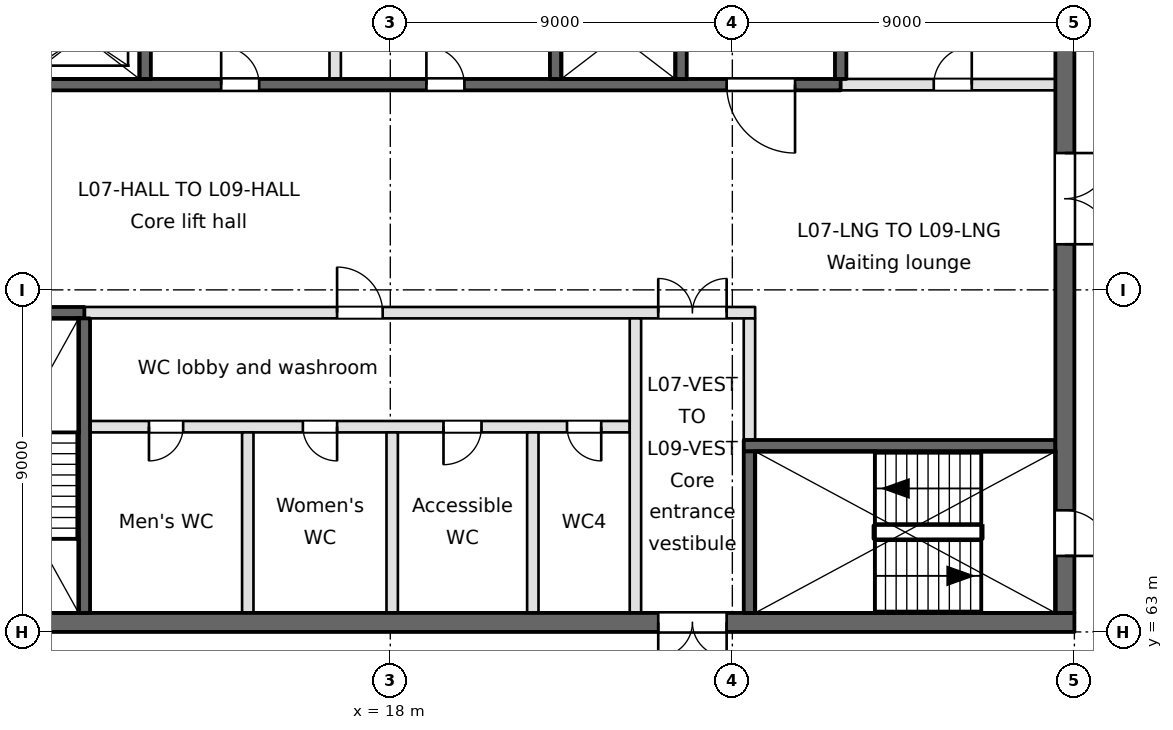
"""IFC4 building model, lengths in metres.
Left out: names, types, materials, properties, quantities, classifications, styles, units other than length and angle.
Written with IfcOpenShell. Run it as: python <this file> out.ifc"""

import sys

from ifc_helpers import new_model, si_unit, direction, frame, frame_2d, origin, place, context, subcontext, project, spatial, rectangle, extrude, element, fill, save


model = new_model("IFC4")
c1 = context("Model", 3, precision=1e-05, world=origin(), true_north=direction((0.0, 1.0)))
c2 = subcontext(c1, "Body", "Model", "MODEL_VIEW")
j1 = project(units=[si_unit("LENGTHUNIT", "METRE"), si_unit("PLANEANGLEUNIT", "RADIAN")], contexts=[c1])
p1 = place(None, origin())
s1 = spatial("IfcSite", under=j1, at=p1, CompositionType="ELEMENT")
p2 = place(p1, origin())
s2 = spatial("IfcBuilding", under=s1, at=p2, CompositionType="ELEMENT")
p3 = place(p2, frame((0.0, 0.0, 35.8)))
s3 = spatial("IfcBuildingStorey", under=s2, at=p3, CompositionType="ELEMENT", Elevation=35.8)
p4 = place(p3, frame((0.9, 63.25, -0.4), z_axis=(0.0, 0.0, 1.0), x_axis=(1.0, 0.0, 0.0)))
e1 = element("IfcWall", 1, at=p4, inside=s3, PredefinedType="SOLIDWALL", context=c2, shape_type="SweptSolid", body=[
    extrude(rectangle(XDim=35.1, YDim=0.5, at=frame_2d((17.55, 0.0))), origin(), (0.0, 0.0, 1.0), 3.7),
])
p5 = place(p4, frame((24.15, 0.0, 0.4)))
e2 = element("IfcOpeningElement", 2, at=p5, cuts=e1, PredefinedType="OPENING", context=c2, shape_type="SweptSolid", body=[
    extrude(rectangle(XDim=1.8, YDim=2.1, at=frame_2d((0.9, 1.05))), frame((0.0, 0.25, 0.0), z_axis=(0.0, -1.0, 0.0), x_axis=(1.0, 0.0, 0.0)), (0.0, 0.0, 1.0), 0.5),
])
p6 = place(p4, frame((1.55, 0.0, 0.4)))
e3 = element("IfcOpeningElement", 3, at=p6, cuts=e1, PredefinedType="OPENING", context=c2, shape_type="SweptSolid", body=[
    extrude(rectangle(XDim=1.2, YDim=2.1, at=frame_2d((0.6, 1.05))), frame((0.0, 0.25, 0.0), z_axis=(0.0, -1.0, 0.0), x_axis=(1.0, 0.0, 0.0)), (0.0, 0.0, 1.0), 0.5),
])
p7 = place(p4, frame((6.15, 0.0, 0.4)))
e4 = element("IfcOpeningElement", 4, at=p7, cuts=e1, PredefinedType="OPENING", context=c2, shape_type="SweptSolid", body=[
    extrude(rectangle(XDim=1.2, YDim=2.1, at=frame_2d((0.6, 1.05))), frame((0.0, 0.25, 0.0), z_axis=(0.0, -1.0, 0.0), x_axis=(1.0, 0.0, 0.0)), (0.0, 0.0, 1.0), 0.5),
])
p8 = place(p3, frame((27.3, 67.9, -0.4), z_axis=(0.0, 0.0, 1.0), x_axis=(1.0, 0.0, 0.0)))
e5 = element("IfcWall", 5, at=p8, inside=s3, PredefinedType="SOLIDWALL", context=c2, shape_type="SweptSolid", body=[
    extrude(rectangle(XDim=8.2, YDim=0.3, at=frame_2d((4.1, 0.0))), origin(), (0.0, 0.0, 1.0), 3.7),
])
p9 = place(p3, frame((10.1, 68.4, 0.0), z_axis=(0.0, 0.0, 1.0), x_axis=(1.0, 0.0, 0.0)))
e6 = element("IfcWall", 6, at=p9, inside=s3, PredefinedType="PARTITIONING", context=c2, shape_type="SweptSolid", body=[
    extrude(rectangle(XDim=14.2, YDim=0.3, at=frame_2d((7.1, 0.0))), origin(), (0.0, 0.0, 1.0), 3.3),
])
p10 = place(p9, frame((1.55, 0.0, 0.0)))
e7 = element("IfcOpeningElement", 7, at=p10, cuts=e6, PredefinedType="OPENING", context=c2, shape_type="SweptSolid", body=[
    extrude(rectangle(XDim=0.9, YDim=2.1, at=frame_2d((0.45, 1.05))), frame((0.0, 0.15, 0.0), z_axis=(0.0, -1.0, 0.0), x_axis=(1.0, 0.0, 0.0)), (0.0, 0.0, 1.0), 0.3),
])
p11 = place(p9, frame((5.6, 0.0, 0.0)))
e8 = element("IfcOpeningElement", 8, at=p11, cuts=e6, PredefinedType="OPENING", context=c2, shape_type="SweptSolid", body=[
    extrude(rectangle(XDim=0.9, YDim=2.1, at=frame_2d((0.45, 1.05))), frame((0.0, 0.15, 0.0), z_axis=(0.0, -1.0, 0.0), x_axis=(1.0, 0.0, 0.0)), (0.0, 0.0, 1.0), 0.3),
])
p12 = place(p9, frame((9.3, 0.0, 0.0)))
e9 = element("IfcOpeningElement", 9, at=p12, cuts=e6, PredefinedType="OPENING", context=c2, shape_type="SweptSolid", body=[
    extrude(rectangle(XDim=1.0, YDim=2.1, at=frame_2d((0.5, 1.05))), frame((0.0, 0.15, 0.0), z_axis=(0.0, -1.0, 0.0), x_axis=(1.0, 0.0, 0.0)), (0.0, 0.0, 1.0), 0.3),
])
p13 = place(p9, frame((12.55, 0.0, 0.0)))
e10 = element("IfcOpeningElement", 10, at=p13, cuts=e6, PredefinedType="OPENING", context=c2, shape_type="SweptSolid", body=[
    extrude(rectangle(XDim=0.9, YDim=2.1, at=frame_2d((0.45, 1.05))), frame((0.0, 0.15, 0.0), z_axis=(0.0, -1.0, 0.0), x_axis=(1.0, 0.0, 0.0)), (0.0, 0.0, 1.0), 0.3),
])
p14 = place(p3, frame((0.9, 71.4, -0.4), z_axis=(0.0, 0.0, 1.0), x_axis=(1.0, 0.0, 0.0)))
e11 = element("IfcWall", 11, at=p14, inside=s3, PredefinedType="SOLIDWALL", context=c2, shape_type="SweptSolid", body=[
    extrude(rectangle(XDim=9.05, YDim=0.3, at=frame_2d((4.525, 0.0))), origin(), (0.0, 0.0, 1.0), 3.7),
])
p15 = place(p3, frame((9.95, 71.4, 0.0), z_axis=(0.0, 0.0, 1.0), x_axis=(1.0, 0.0, 0.0)))
e12 = element("IfcWall", 12, at=p15, inside=s3, PredefinedType="PARTITIONING", context=c2, shape_type="SweptSolid", body=[
    extrude(rectangle(XDim=17.65, YDim=0.3, at=frame_2d((8.825, 0.0))), origin(), (0.0, 0.0, 1.0), 3.3),
])
p16 = place(p15, frame((15.1, 0.0, 0.0)))
e13 = element("IfcOpeningElement", 13, at=p16, cuts=e12, PredefinedType="OPENING", context=c2, shape_type="SweptSolid", body=[
    extrude(rectangle(XDim=1.8, YDim=2.1, at=frame_2d((0.9, 1.05))), frame((0.0, 0.15, 0.0), z_axis=(0.0, -1.0, 0.0), x_axis=(1.0, 0.0, 0.0)), (0.0, 0.0, 1.0), 0.3),
])
p17 = place(p15, frame((6.65, 0.0, 0.0)))
e14 = element("IfcOpeningElement", 14, at=p17, cuts=e12, PredefinedType="OPENING", context=c2, shape_type="SweptSolid", body=[
    extrude(rectangle(XDim=1.2, YDim=2.1, at=frame_2d((0.6, 1.05))), frame((0.0, 0.15, 0.0), z_axis=(0.0, -1.0, 0.0), x_axis=(1.0, 0.0, 0.0)), (0.0, 0.0, 1.0), 0.3),
])
p18 = place(p3, frame((0.9, 77.4, -0.4), z_axis=(0.0, 0.0, 1.0), x_axis=(1.0, 0.0, 0.0)))
e15 = element("IfcWall", 15, at=p18, inside=s3, PredefinedType="SOLIDWALL", context=c2, shape_type="SweptSolid", body=[
    extrude(rectangle(XDim=28.95, YDim=0.3, at=frame_2d((14.475, 0.0))), origin(), (0.0, 0.0, 1.0), 3.7),
])
p19 = place(p18, frame((4.35, 0.0, 0.4)))
e16 = element("IfcOpeningElement", 16, at=p19, cuts=e15, PredefinedType="OPENING", context=c2, shape_type="SweptSolid", body=[
    extrude(rectangle(XDim=1.8, YDim=2.1, at=frame_2d((0.9, 1.05))), frame((0.0, 0.15, 0.0), z_axis=(0.0, -1.0, 0.0), x_axis=(1.0, 0.0, 0.0)), (0.0, 0.0, 1.0), 0.3),
])
p20 = place(p18, frame((25.95, 0.0, 0.4)))
e17 = element("IfcOpeningElement", 17, at=p20, cuts=e15, PredefinedType="OPENING", context=c2, shape_type="SweptSolid", body=[
    extrude(rectangle(XDim=1.8, YDim=2.1, at=frame_2d((0.9, 1.05))), frame((0.0, 0.15, 0.0), z_axis=(0.0, -1.0, 0.0), x_axis=(1.0, 0.0, 0.0)), (0.0, 0.0, 1.0), 0.3),
])
p21 = place(p18, frame((12.65, 0.0, 0.4)))
e18 = element("IfcOpeningElement", 18, at=p21, cuts=e15, PredefinedType="OPENING", context=c2, shape_type="SweptSolid", body=[
    extrude(rectangle(XDim=1.0, YDim=2.1, at=frame_2d((0.5, 1.05))), frame((0.0, 0.15, 0.0), z_axis=(0.0, -1.0, 0.0), x_axis=(1.0, 0.0, 0.0)), (0.0, 0.0, 1.0), 0.3),
])
p22 = place(p18, frame((18.05, 0.0, 0.4)))
e19 = element("IfcOpeningElement", 19, at=p22, cuts=e15, PredefinedType="OPENING", context=c2, shape_type="SweptSolid", body=[
    extrude(rectangle(XDim=1.0, YDim=2.1, at=frame_2d((0.5, 1.05))), frame((0.0, 0.15, 0.0), z_axis=(0.0, -1.0, 0.0), x_axis=(1.0, 0.0, 0.0)), (0.0, 0.0, 1.0), 0.3),
])
p23 = place(p3, frame((29.85, 77.4, 0.0), z_axis=(0.0, 0.0, 1.0), x_axis=(1.0, 0.0, 0.0)))
e20 = element("IfcWall", 20, at=p23, inside=s3, PredefinedType="PARTITIONING", context=c2, shape_type="SweptSolid", body=[
    extrude(rectangle(XDim=5.65, YDim=0.3, at=frame_2d((2.825, 0.0))), origin(), (0.0, 0.0, 1.0), 3.3),
])
p24 = place(p23, frame((2.45, 0.0, 0.0)))
e21 = element("IfcOpeningElement", 21, at=p24, cuts=e20, PredefinedType="OPENING", context=c2, shape_type="SweptSolid", body=[
    extrude(rectangle(XDim=1.0, YDim=2.1, at=frame_2d((0.5, 1.05))), frame((0.0, 0.15, 0.0), z_axis=(0.0, -1.0, 0.0), x_axis=(1.0, 0.0, 0.0)), (0.0, 0.0, 1.0), 0.3),
])
p25 = place(p3, frame((9.95, 63.5, -0.4), z_axis=(0.0, 0.0, 1.0), x_axis=(0.0, 1.0, 0.0)))
e22 = element("IfcWall", 22, at=p25, inside=s3, PredefinedType="SOLIDWALL", context=c2, shape_type="SweptSolid", body=[
    extrude(rectangle(XDim=7.75, YDim=0.3, at=frame_2d((3.875, 0.0))), origin(), (0.0, 0.0, 1.0), 3.7),
])
p26 = place(p3, frame((11.55, 77.55, -0.4), z_axis=(0.0, 0.0, 1.0), x_axis=(0.0, 1.0, 0.0)))
e23 = element("IfcWall", 23, at=p26, inside=s3, PredefinedType="SOLIDWALL", context=c2, shape_type="SweptSolid", body=[
    extrude(rectangle(XDim=10.1, YDim=0.3, at=frame_2d((5.05, 0.0))), origin(), (0.0, 0.0, 1.0), 3.7),
])
p27 = place(p3, frame((14.25, 63.5, 0.0), z_axis=(0.0, 0.0, 1.0), x_axis=(0.0, 1.0, 0.0)))
e24 = element("IfcWall", 24, at=p27, inside=s3, PredefinedType="PARTITIONING", context=c2, shape_type="SweptSolid", body=[
    extrude(rectangle(XDim=4.75, YDim=0.3, at=frame_2d((2.375, 0.0))), origin(), (0.0, 0.0, 1.0), 3.3),
])
p28 = place(p3, frame((16.55, 77.55, 0.0), z_axis=(0.0, 0.0, 1.0), x_axis=(0.0, 1.0, 0.0)))
e25 = element("IfcWall", 25, at=p28, inside=s3, PredefinedType="PARTITIONING", context=c2, shape_type="SweptSolid", body=[
    extrude(rectangle(XDim=12.95, YDim=0.3, at=frame_2d((6.475, 0.0))), origin(), (0.0, 0.0, 1.0), 3.3),
])
for number, where, z_axis, x_axis in (
    (26, (18.05, 63.5, 0.0), (0.0, 0.0, 1.0), (0.0, 1.0, 0.0)),
    (27, (21.75, 63.5, 0.0), (0.0, 0.0, 1.0), (0.0, 1.0, 0.0)),
):
    element("IfcWall", number, at=place(p3, frame(where, z_axis=z_axis, x_axis=x_axis)), inside=s3, PredefinedType="PARTITIONING", context=c2, shape_type="SweptSolid", body=[
        extrude(rectangle(XDim=4.75, YDim=0.3, at=frame_2d((2.375, 0.0))), origin(), (0.0, 0.0, 1.0), 3.3),
    ])
p29 = place(p3, frame((22.35, 77.55, -0.4), z_axis=(0.0, 0.0, 1.0), x_axis=(0.0, 1.0, 0.0)))
e28 = element("IfcWall", 28, at=p29, inside=s3, PredefinedType="SOLIDWALL", context=c2, shape_type="SweptSolid", body=[
    extrude(rectangle(XDim=10.1, YDim=0.3, at=frame_2d((5.05, 0.0))), origin(), (0.0, 0.0, 1.0), 3.7),
])
p30 = place(p3, frame((24.45, 63.5, 0.0), z_axis=(0.0, 0.0, 1.0), x_axis=(0.0, 1.0, 0.0)))
e29 = element("IfcWall", 29, at=p30, inside=s3, PredefinedType="PARTITIONING", context=c2, shape_type="SweptSolid", body=[
    extrude(rectangle(XDim=7.75, YDim=0.3, at=frame_2d((3.875, 0.0))), origin(), (0.0, 0.0, 1.0), 3.3),
])
p31 = place(p3, frame((25.65, 77.55, -0.4), z_axis=(0.0, 0.0, 1.0), x_axis=(0.0, 1.0, 0.0)))
e30 = element("IfcWall", 30, at=p31, inside=s3, PredefinedType="SOLIDWALL", context=c2, shape_type="SweptSolid", body=[
    extrude(rectangle(XDim=10.1, YDim=0.3, at=frame_2d((5.05, 0.0))), origin(), (0.0, 0.0, 1.0), 3.7),
])
p32 = place(p3, frame((27.45, 63.5, -0.4), z_axis=(0.0, 0.0, 1.0), x_axis=(0.0, 1.0, 0.0)))
e31 = element("IfcWall", 31, at=p32, inside=s3, PredefinedType="SOLIDWALL", context=c2, shape_type="SweptSolid", body=[
    extrude(rectangle(XDim=4.25, YDim=0.3, at=frame_2d((2.125, 0.0))), origin(), (0.0, 0.0, 1.0), 3.7),
])
p33 = place(p3, frame((27.45, 68.05, 0.0), z_axis=(0.0, 0.0, 1.0), x_axis=(0.0, 1.0, 0.0)))
e32 = element("IfcWall", 32, at=p33, inside=s3, PredefinedType="PARTITIONING", context=c2, shape_type="SweptSolid", body=[
    extrude(rectangle(XDim=3.2, YDim=0.3, at=frame_2d((1.6, 0.0))), origin(), (0.0, 0.0, 1.0), 3.3),
])
p34 = place(p3, frame((29.85, 77.55, -0.4), z_axis=(0.0, 0.0, 1.0), x_axis=(0.0, 1.0, 0.0)))
e33 = element("IfcWall", 33, at=p34, inside=s3, PredefinedType="SOLIDWALL", context=c2, shape_type="SweptSolid", body=[
    extrude(rectangle(XDim=10.1, YDim=0.3, at=frame_2d((5.05, 0.0))), origin(), (0.0, 0.0, 1.0), 3.7),
])
p35 = place(p3, frame((35.75, 63.5, -0.4), z_axis=(0.0, 0.0, 1.0), x_axis=(0.0, 1.0, 0.0)))
e34 = element("IfcWall", 34, at=p35, inside=s3, PredefinedType="SOLIDWALL", context=c2, shape_type="SweptSolid", body=[
    extrude(rectangle(XDim=34.6, YDim=0.5, at=frame_2d((17.3, 0.0))), origin(), (0.0, 0.0, 1.0), 3.7),
])
p36 = place(p35, frame((9.7, 0.0, 0.4)))
e35 = element("IfcOpeningElement", 35, at=p36, cuts=e34, PredefinedType="OPENING", context=c2, shape_type="SweptSolid", body=[
    extrude(rectangle(XDim=2.4, YDim=2.1, at=frame_2d((1.2, 1.05))), frame((0.0, 0.25, 0.0), z_axis=(0.0, -1.0, 0.0), x_axis=(1.0, 0.0, 0.0)), (0.0, 0.0, 1.0), 0.5),
])
p37 = place(p35, frame((27.9, 0.0, 0.4)))
e36 = element("IfcOpeningElement", 36, at=p37, cuts=e34, PredefinedType="OPENING", context=c2, shape_type="SweptSolid", body=[
    extrude(rectangle(XDim=1.5, YDim=2.1, at=frame_2d((0.75, 1.05))), frame((0.0, 0.25, 0.0), z_axis=(0.0, -1.0, 0.0), x_axis=(1.0, 0.0, 0.0)), (0.0, 0.0, 1.0), 0.5),
])
p38 = place(p35, frame((1.5, 0.0, 0.4)))
e37 = element("IfcOpeningElement", 37, at=p38, cuts=e34, PredefinedType="OPENING", context=c2, shape_type="SweptSolid", body=[
    extrude(rectangle(XDim=1.2, YDim=2.1, at=frame_2d((0.6, 1.05))), frame((0.0, 0.25, 0.0), z_axis=(0.0, -1.0, 0.0), x_axis=(1.0, 0.0, 0.0)), (0.0, 0.0, 1.0), 0.5),
])
p39 = place(p20, frame((1.8, 0.0, 0.0), z_axis=(0.0, 0.0, 1.0), x_axis=(-1.0, 0.0, 0.0)))
e38 = element("IfcDoor", 38, at=p39, inside=s3, OperationType="SINGLE_SWING_LEFT", PredefinedType="DOOR", context=c2, shape_type="SweptSolid", body=[
    extrude(rectangle(XDim=1.8, YDim=2.1, at=frame_2d((0.9, 1.05))), frame((0.0, 0.025, 0.0), z_axis=(0.0, -1.0, 0.0), x_axis=(1.0, 0.0, 0.0)), (0.0, 0.0, 1.0), 0.05),
])
fill(e17, e38)
p40 = place(p36, frame((2.4, 0.0, 0.0), z_axis=(0.0, 0.0, 1.0), x_axis=(-1.0, 0.0, 0.0)))
e39 = element("IfcDoor", 39, at=p40, inside=s3, OperationType="DOUBLE_DOOR_SINGLE_SWING", PredefinedType="DOOR", context=c2, shape_type="SweptSolid", body=[
    extrude(rectangle(XDim=2.4, YDim=2.1, at=frame_2d((1.2, 1.05))), frame((0.0, 0.025, 0.0), z_axis=(0.0, -1.0, 0.0), x_axis=(1.0, 0.0, 0.0)), (0.0, 0.0, 1.0), 0.05),
])
fill(e35, e39)
p41 = place(p5, frame((1.8, 0.0, 0.0), z_axis=(0.0, 0.0, 1.0), x_axis=(-1.0, 0.0, 0.0)))
e40 = element("IfcDoor", 40, at=p41, inside=s3, OperationType="DOUBLE_DOOR_SINGLE_SWING", PredefinedType="DOOR", context=c2, shape_type="SweptSolid", body=[
    extrude(rectangle(XDim=1.8, YDim=2.1, at=frame_2d((0.9, 1.05))), frame((0.0, 0.025, 0.0), z_axis=(0.0, -1.0, 0.0), x_axis=(1.0, 0.0, 0.0)), (0.0, 0.0, 1.0), 0.05),
])
fill(e2, e40)
p42 = place(p16, origin())
e41 = element("IfcDoor", 41, at=p42, inside=s3, OperationType="DOUBLE_DOOR_SINGLE_SWING", PredefinedType="DOOR", context=c2, shape_type="SweptSolid", body=[
    extrude(rectangle(XDim=1.8, YDim=2.1, at=frame_2d((0.9, 1.05))), frame((0.0, 0.025, 0.0), z_axis=(0.0, -1.0, 0.0), x_axis=(1.0, 0.0, 0.0)), (0.0, 0.0, 1.0), 0.05),
])
fill(e13, e41)
p43 = place(p10, frame((0.9, 0.0, 0.0), z_axis=(0.0, 0.0, 1.0), x_axis=(-1.0, 0.0, 0.0)))
e42 = element("IfcDoor", 42, at=p43, inside=s3, OperationType="SINGLE_SWING_RIGHT", PredefinedType="DOOR", context=c2, shape_type="SweptSolid", body=[
    extrude(rectangle(XDim=0.9, YDim=2.1, at=frame_2d((0.45, 1.05))), frame((0.0, 0.025, 0.0), z_axis=(0.0, -1.0, 0.0), x_axis=(1.0, 0.0, 0.0)), (0.0, 0.0, 1.0), 0.05),
])
fill(e7, e42)
p44 = place(p11, frame((0.9, 0.0, 0.0), z_axis=(0.0, 0.0, 1.0), x_axis=(-1.0, 0.0, 0.0)))
e43 = element("IfcDoor", 43, at=p44, inside=s3, OperationType="SINGLE_SWING_LEFT", PredefinedType="DOOR", context=c2, shape_type="SweptSolid", body=[
    extrude(rectangle(XDim=0.9, YDim=2.1, at=frame_2d((0.45, 1.05))), frame((0.0, 0.025, 0.0), z_axis=(0.0, -1.0, 0.0), x_axis=(1.0, 0.0, 0.0)), (0.0, 0.0, 1.0), 0.05),
])
fill(e8, e43)
p45 = place(p12, frame((1.0, 0.0, 0.0), z_axis=(0.0, 0.0, 1.0), x_axis=(-1.0, 0.0, 0.0)))
e44 = element("IfcDoor", 44, at=p45, inside=s3, OperationType="SINGLE_SWING_RIGHT", PredefinedType="DOOR", context=c2, shape_type="SweptSolid", body=[
    extrude(rectangle(XDim=1.0, YDim=2.1, at=frame_2d((0.5, 1.05))), frame((0.0, 0.025, 0.0), z_axis=(0.0, -1.0, 0.0), x_axis=(1.0, 0.0, 0.0)), (0.0, 0.0, 1.0), 0.05),
])
fill(e9, e44)
p46 = place(p13, frame((0.9, 0.0, 0.0), z_axis=(0.0, 0.0, 1.0), x_axis=(-1.0, 0.0, 0.0)))
e45 = element("IfcDoor", 45, at=p46, inside=s3, OperationType="SINGLE_SWING_LEFT", PredefinedType="DOOR", context=c2, shape_type="SweptSolid", body=[
    extrude(rectangle(XDim=0.9, YDim=2.1, at=frame_2d((0.45, 1.05))), frame((0.0, 0.025, 0.0), z_axis=(0.0, -1.0, 0.0), x_axis=(1.0, 0.0, 0.0)), (0.0, 0.0, 1.0), 0.05),
])
fill(e10, e45)
p47 = place(p17, origin())
e46 = element("IfcDoor", 46, at=p47, inside=s3, OperationType="SINGLE_SWING_LEFT", PredefinedType="DOOR", context=c2, shape_type="SweptSolid", body=[
    extrude(rectangle(XDim=1.2, YDim=2.1, at=frame_2d((0.6, 1.05))), frame((0.0, 0.025, 0.0), z_axis=(0.0, -1.0, 0.0), x_axis=(1.0, 0.0, 0.0)), (0.0, 0.0, 1.0), 0.05),
])
fill(e14, e46)
p48 = place(p38, frame((1.2, 0.0, 0.0), z_axis=(0.0, 0.0, 1.0), x_axis=(-1.0, 0.0, 0.0)))
e47 = element("IfcDoor", 47, at=p48, inside=s3, OperationType="SINGLE_SWING_RIGHT", PredefinedType="DOOR", context=c2, shape_type="SweptSolid", body=[
    extrude(rectangle(XDim=1.2, YDim=2.1, at=frame_2d((0.6, 1.05))), frame((0.0, 0.025, 0.0), z_axis=(0.0, -1.0, 0.0), x_axis=(1.0, 0.0, 0.0)), (0.0, 0.0, 1.0), 0.05),
])
fill(e37, e47)
p49 = place(p21, origin())
e48 = element("IfcDoor", 48, at=p49, inside=s3, OperationType="SINGLE_SWING_LEFT", PredefinedType="DOOR", context=c2, shape_type="SweptSolid", body=[
    extrude(rectangle(XDim=1.0, YDim=2.1, at=frame_2d((0.5, 1.05))), frame((0.0, 0.025, 0.0), z_axis=(0.0, -1.0, 0.0), x_axis=(1.0, 0.0, 0.0)), (0.0, 0.0, 1.0), 0.05),
])
fill(e18, e48)
p50 = place(p22, origin())
e49 = element("IfcDoor", 49, at=p50, inside=s3, OperationType="SINGLE_SWING_LEFT", PredefinedType="DOOR", context=c2, shape_type="SweptSolid", body=[
    extrude(rectangle(XDim=1.0, YDim=2.1, at=frame_2d((0.5, 1.05))), frame((0.0, 0.025, 0.0), z_axis=(0.0, -1.0, 0.0), x_axis=(1.0, 0.0, 0.0)), (0.0, 0.0, 1.0), 0.05),
])
fill(e19, e49)
p51 = place(p24, origin())
e50 = element("IfcDoor", 50, at=p51, inside=s3, OperationType="SINGLE_SWING_RIGHT", PredefinedType="DOOR", context=c2, shape_type="SweptSolid", body=[
    extrude(rectangle(XDim=1.0, YDim=2.1, at=frame_2d((0.5, 1.05))), frame((0.0, 0.025, 0.0), z_axis=(0.0, -1.0, 0.0), x_axis=(1.0, 0.0, 0.0)), (0.0, 0.0, 1.0), 0.05),
])
fill(e21, e50)
save(model, sys.argv[1])
